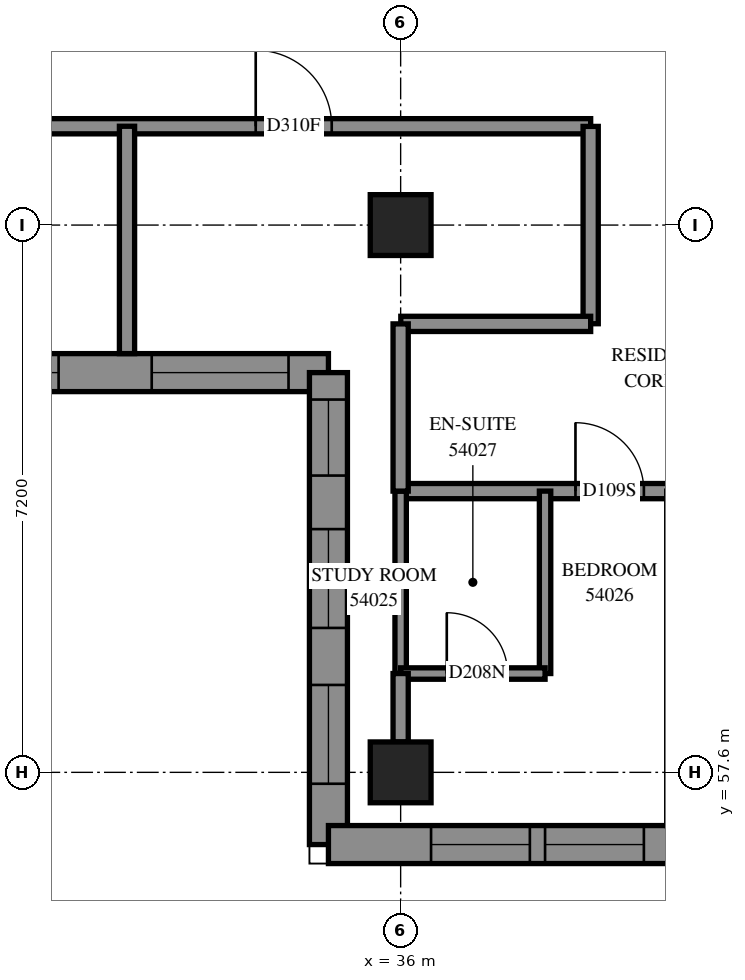
"""IFC4 building model, lengths in metres.
Left out: names, types, materials, properties, quantities, classifications, styles, units other than length and angle.
Written with IfcOpenShell. Run it as: python <this file> out.ifc"""

import sys

from ifc_helpers import new_model, si_unit, direction, frame, frame_2d, origin, origin_2d, place, context, subcontext, project, spatial, polyline, rectangle, outline, extrude, element, fill, save


model = new_model("IFC4")
c1 = context("Model", 3, precision=1e-05, world=origin(), true_north=direction((0.0, 1.0)))
c2 = subcontext(c1, "Body", "Model", "MODEL_VIEW")
j1 = project(units=[si_unit("LENGTHUNIT", "METRE"), si_unit("PLANEANGLEUNIT", "RADIAN")], contexts=[c1])
p1 = place(None, origin())
s1 = spatial("IfcSite", under=j1, at=p1, CompositionType="ELEMENT")
p2 = place(p1, origin())
s2 = spatial("IfcBuilding", under=s1, at=p2, CompositionType="ELEMENT")
p3 = place(p2, frame((0.0, 0.0, 199.8)))
s3 = spatial("IfcBuildingStorey", under=s2, at=p3, CompositionType="ELEMENT", Elevation=199.8)
for number, where, z_axis, x_axis in (
    (1, (36.0, 57.6, 0.0), (0.0, 0.0, 1.0), (1.0, 0.0, 0.0)),
    (2, (36.0, 64.8, 0.0), (0.0, 0.0, 1.0), (1.0, 0.0, 0.0)),
):
    element("IfcColumn", number, at=place(p3, frame(where, z_axis=z_axis, x_axis=x_axis)), inside=s3, PredefinedType="COLUMN", context=c2, shape_type="SweptSolid", body=[
        extrude(rectangle(XDim=0.8, YDim=0.8, at=origin_2d()), origin(), (0.0, 0.0, 1.0), 3.1),
    ])
p4 = place(p3, frame((19.659, 62.859, 0.0), z_axis=(0.0, 0.0, 1.0), x_axis=(1.0, 0.0, 0.0)))
e3 = element("IfcWall", 3, at=p4, inside=s3, PredefinedType="SOLIDWALL", context=c2, shape_type="SweptSolid", body=[
    extrude(outline(polyline([(-0.25, -0.25), (15.141, -0.25), (15.641, 0.25), (0.25, 0.25), (-0.25, -0.25)])), origin(), (0.0, 0.0, 1.0), 2.6),
])
p5 = place(p4, frame((2.691, 0.0, 0.6)))
e4 = element("IfcOpeningElement", 4, at=p5, cuts=e3, PredefinedType="OPENING", context=c2, shape_type="SweptSolid", body=[
    extrude(rectangle(XDim=1.8, YDim=1.9, at=frame_2d((0.9, 0.95))), frame((0.0, 0.26, 0.0), z_axis=(0.0, -1.0, 0.0), x_axis=(1.0, 0.0, 0.0)), (0.0, 0.0, 1.0), 0.52),
])
p6 = place(p4, frame((6.441, 0.0, 0.6)))
e5 = element("IfcOpeningElement", 5, at=p6, cuts=e3, PredefinedType="OPENING", context=c2, shape_type="SweptSolid", body=[
    extrude(rectangle(XDim=1.8, YDim=1.9, at=frame_2d((0.9, 0.95))), frame((0.0, 0.26, 0.0), z_axis=(0.0, -1.0, 0.0), x_axis=(1.0, 0.0, 0.0)), (0.0, 0.0, 1.0), 0.52),
])
p7 = place(p4, frame((10.041, 0.0, 0.6)))
e6 = element("IfcOpeningElement", 6, at=p7, cuts=e3, PredefinedType="OPENING", context=c2, shape_type="SweptSolid", body=[
    extrude(rectangle(XDim=1.8, YDim=1.9, at=frame_2d((0.9, 0.95))), frame((0.0, 0.26, 0.0), z_axis=(0.0, -1.0, 0.0), x_axis=(1.0, 0.0, 0.0)), (0.0, 0.0, 1.0), 0.52),
])
p8 = place(p4, frame((13.066, 0.0, 0.6)))
e7 = element("IfcOpeningElement", 7, at=p8, cuts=e3, PredefinedType="OPENING", context=c2, shape_type="SweptSolid", body=[
    extrude(rectangle(XDim=1.8, YDim=1.9, at=frame_2d((0.9, 0.95))), frame((0.0, 0.26, 0.0), z_axis=(0.0, -1.0, 0.0), x_axis=(1.0, 0.0, 0.0)), (0.0, 0.0, 1.0), 0.52),
])
p9 = place(p4, frame((0.596, 0.0, 0.6)))
e8 = element("IfcOpeningElement", 8, at=p9, cuts=e3, PredefinedType="OPENING", context=c2, shape_type="SweptSolid", body=[
    extrude(rectangle(XDim=1.2, YDim=1.9, at=frame_2d((0.6, 0.95))), frame((0.0, 0.26, 0.0), z_axis=(0.0, -1.0, 0.0), x_axis=(1.0, 0.0, 0.0)), (0.0, 0.0, 1.0), 0.52),
])
p10 = place(p3, frame((35.05, 62.859, 0.0), z_axis=(0.0, 0.0, 1.0), x_axis=(0.0, -1.0, 0.0)))
e9 = element("IfcWall", 9, at=p10, inside=s3, PredefinedType="SOLIDWALL", context=c2, shape_type="SweptSolid", body=[
    extrude(outline(polyline([(0.25, -0.25), (6.459, -0.25), (5.959, 0.25), (-0.25, 0.25), (0.25, -0.25)])), origin(), (0.0, 0.0, 1.0), 3.1),
])
p11 = place(p10, frame((2.059, 0.0, 0.45)))
e10 = element("IfcOpeningElement", 10, at=p11, cuts=e9, PredefinedType="OPENING", context=c2, shape_type="SweptSolid", body=[
    extrude(rectangle(XDim=1.3, YDim=2.5, at=frame_2d((0.65, 1.25))), frame((0.0, 0.26, 0.0), z_axis=(0.0, -1.0, 0.0), x_axis=(1.0, 0.0, 0.0)), (0.0, 0.0, 1.0), 0.52),
])
p12 = place(p10, frame((4.109, 0.0, 0.45)))
e11 = element("IfcOpeningElement", 11, at=p12, cuts=e9, PredefinedType="OPENING", context=c2, shape_type="SweptSolid", body=[
    extrude(rectangle(XDim=1.3, YDim=2.5, at=frame_2d((0.65, 1.25))), frame((0.0, 0.26, 0.0), z_axis=(0.0, -1.0, 0.0), x_axis=(1.0, 0.0, 0.0)), (0.0, 0.0, 1.0), 0.52),
])
p13 = place(p10, frame((0.354, 0.0, 0.45)))
e12 = element("IfcOpeningElement", 12, at=p13, cuts=e9, PredefinedType="OPENING", context=c2, shape_type="SweptSolid", body=[
    extrude(rectangle(XDim=1.0, YDim=2.5, at=frame_2d((0.5, 1.25))), frame((0.0, 0.26, 0.0), z_axis=(0.0, -1.0, 0.0), x_axis=(1.0, 0.0, 0.0)), (0.0, 0.0, 1.0), 0.52),
])
p14 = place(p3, frame((35.05, 56.65, 0.0), z_axis=(0.0, 0.0, 1.0), x_axis=(1.0, 0.0, 0.0)))
e13 = element("IfcWall", 13, at=p14, inside=s3, PredefinedType="SOLIDWALL", context=c2, shape_type="SweptSolid", body=[
    extrude(outline(polyline([(-0.25, -0.25), (6.95, -0.25), (7.45, 0.25), (0.25, 0.25), (-0.25, -0.25)])), origin(), (0.0, 0.0, 1.0), 3.1),
])
p15 = place(p14, frame((1.35, 0.0, 0.45)))
e14 = element("IfcOpeningElement", 14, at=p15, cuts=e13, PredefinedType="OPENING", context=c2, shape_type="SweptSolid", body=[
    extrude(rectangle(XDim=1.3, YDim=2.5, at=frame_2d((0.65, 1.25))), frame((0.0, 0.26, 0.0), z_axis=(0.0, -1.0, 0.0), x_axis=(1.0, 0.0, 0.0)), (0.0, 0.0, 1.0), 0.52),
])
p16 = place(p14, frame((2.85, 0.0, 0.45)))
e15 = element("IfcOpeningElement", 15, at=p16, cuts=e13, PredefinedType="OPENING", context=c2, shape_type="SweptSolid", body=[
    extrude(rectangle(XDim=1.3, YDim=2.5, at=frame_2d((0.65, 1.25))), frame((0.0, 0.26, 0.0), z_axis=(0.0, -1.0, 0.0), x_axis=(1.0, 0.0, 0.0)), (0.0, 0.0, 1.0), 0.52),
])
p17 = place(p14, frame((5.175, 0.0, 0.45)))
e16 = element("IfcOpeningElement", 16, at=p17, cuts=e13, PredefinedType="OPENING", context=c2, shape_type="SweptSolid", body=[
    extrude(rectangle(XDim=1.2, YDim=2.5, at=frame_2d((0.6, 1.25))), frame((0.0, 0.26, 0.0), z_axis=(0.0, -1.0, 0.0), x_axis=(1.0, 0.0, 0.0)), (0.0, 0.0, 1.0), 0.52),
])
p18 = place(p3, frame((21.6, 66.1, 0.0), z_axis=(0.0, 0.0, 1.0), x_axis=(1.0, 0.0, 0.0)))
e17 = element("IfcWall", 17, at=p18, inside=s3, PredefinedType="PARTITIONING", context=c2, shape_type="SweptSolid", body=[
    extrude(rectangle(XDim=16.9, YDim=0.2, at=frame_2d((8.45, 0.0))), origin(), (0.0, 0.0, 1.0), 3.1),
])
p19 = place(p18, frame((12.493, 0.0, 0.0)))
e18 = element("IfcOpeningElement", 18, at=p19, cuts=e17, PredefinedType="OPENING", context=c2, shape_type="SweptSolid", body=[
    extrude(rectangle(XDim=1.0, YDim=2.1, at=frame_2d((0.5, 1.05))), frame((0.0, 0.11, 0.0), z_axis=(0.0, -1.0, 0.0), x_axis=(1.0, 0.0, 0.0)), (0.0, 0.0, 1.0), 0.22),
])
p20 = place(p3, frame((36.0, 61.3, 0.0), z_axis=(0.0, 0.0, 1.0), x_axis=(1.0, 0.0, 0.0)))
e19 = element("IfcWall", 19, at=p20, inside=s3, PredefinedType="PARTITIONING", context=c2, shape_type="SweptSolid", body=[
    extrude(rectangle(XDim=16.9, YDim=0.2, at=frame_2d((8.45, 0.0))), origin(), (0.0, 0.0, 1.0), 3.1),
])
p21 = place(p20, frame((2.3, 0.0, 0.0)))
e20 = element("IfcOpeningElement", 20, at=p21, cuts=e19, PredefinedType="OPENING", context=c2, shape_type="SweptSolid", body=[
    extrude(rectangle(XDim=0.9, YDim=2.1, at=frame_2d((0.45, 1.05))), frame((0.0, 0.11, 0.0), z_axis=(0.0, -1.0, 0.0), x_axis=(1.0, 0.0, 0.0)), (0.0, 0.0, 1.0), 0.22),
])
p22 = place(p20, frame((4.107, 0.0, 0.0)))
e21 = element("IfcOpeningElement", 21, at=p22, cuts=e19, PredefinedType="OPENING", context=c2, shape_type="SweptSolid", body=[
    extrude(rectangle(XDim=1.0, YDim=2.1, at=frame_2d((0.5, 1.05))), frame((0.0, 0.11, 0.0), z_axis=(0.0, -1.0, 0.0), x_axis=(1.0, 0.0, 0.0)), (0.0, 0.0, 1.0), 0.22),
])
p23 = place(p20, frame((9.5, 0.0, 0.0)))
e22 = element("IfcOpeningElement", 22, at=p23, cuts=e19, PredefinedType="OPENING", context=c2, shape_type="SweptSolid", body=[
    extrude(rectangle(XDim=0.9, YDim=2.1, at=frame_2d((0.45, 1.05))), frame((0.0, 0.11, 0.0), z_axis=(0.0, -1.0, 0.0), x_axis=(1.0, 0.0, 0.0)), (0.0, 0.0, 1.0), 0.22),
])
p24 = place(p20, frame((11.307, 0.0, 0.0)))
e23 = element("IfcOpeningElement", 23, at=p24, cuts=e19, PredefinedType="OPENING", context=c2, shape_type="SweptSolid", body=[
    extrude(rectangle(XDim=1.0, YDim=2.1, at=frame_2d((0.5, 1.05))), frame((0.0, 0.11, 0.0), z_axis=(0.0, -1.0, 0.0), x_axis=(1.0, 0.0, 0.0)), (0.0, 0.0, 1.0), 0.22),
])
p25 = place(p20, frame((15.647, 0.0, 0.0)))
e24 = element("IfcOpeningElement", 24, at=p25, cuts=e19, PredefinedType="OPENING", context=c2, shape_type="SweptSolid", body=[
    extrude(rectangle(XDim=1.0, YDim=2.1, at=frame_2d((0.5, 1.05))), frame((0.0, 0.11, 0.0), z_axis=(0.0, -1.0, 0.0), x_axis=(1.0, 0.0, 0.0)), (0.0, 0.0, 1.0), 0.22),
])
p26 = place(p3, frame((32.4, 63.109, 0.0), z_axis=(0.0, 0.0, 1.0), x_axis=(0.0, 1.0, 0.0)))
e25 = element("IfcWall", 25, at=p26, inside=s3, PredefinedType="PARTITIONING", context=c2, shape_type="SweptSolid", body=[
    extrude(rectangle(XDim=2.991, YDim=0.2, at=frame_2d((1.496, 0.0))), origin(), (0.0, 0.0, 1.0), 3.1),
])
p27 = place(p3, frame((38.5, 63.502, 0.0), z_axis=(0.0, 0.0, 1.0), x_axis=(0.0, 1.0, 0.0)))
e26 = element("IfcWall", 26, at=p27, inside=s3, PredefinedType="PARTITIONING", context=c2, shape_type="SweptSolid", body=[
    extrude(rectangle(XDim=2.596, YDim=0.2, at=frame_2d((1.298, 0.0))), origin(), (0.0, 0.0, 1.0), 3.1),
])
p28 = place(p3, frame((36.002, 63.5, 0.0), z_axis=(0.0, 0.0, 1.0), x_axis=(1.0, 0.0, 0.0)))
e27 = element("IfcWall", 27, at=p28, inside=s3, PredefinedType="PARTITIONING", context=c2, shape_type="SweptSolid", body=[
    extrude(rectangle(XDim=2.498, YDim=0.2, at=frame_2d((1.249, 0.0))), origin(), (0.0, 0.0, 1.0), 3.1),
])
p29 = place(p3, frame((37.9, 58.9, 0.0), z_axis=(0.0, 0.0, 1.0), x_axis=(0.0, 1.0, 0.0)))
e28 = element("IfcWall", 28, at=p29, inside=s3, PredefinedType="PARTITIONING", context=c2, shape_type="SweptSolid", body=[
    extrude(rectangle(XDim=2.4, YDim=0.15, at=frame_2d((1.2, 0.0))), origin(), (0.0, 0.0, 1.0), 3.1),
])
p30 = place(p3, frame((36.0, 58.9, 0.0), z_axis=(0.0, 0.0, 1.0), x_axis=(0.0, 1.0, 0.0)))
e29 = element("IfcWall", 29, at=p30, inside=s3, PredefinedType="PARTITIONING", context=c2, shape_type="SweptSolid", body=[
    extrude(rectangle(XDim=2.4, YDim=0.15, at=frame_2d((1.2, 0.0))), origin(), (0.0, 0.0, 1.0), 2.6),
])
p31 = place(p3, frame((36.0, 61.3, 0.0), z_axis=(0.0, 0.0, 1.0), x_axis=(0.0, 1.0, 0.0)))
e30 = element("IfcWall", 30, at=p31, inside=s3, PredefinedType="PARTITIONING", context=c2, shape_type="SweptSolid", body=[
    extrude(rectangle(XDim=2.2, YDim=0.2, at=frame_2d((1.1, 0.0))), origin(), (0.0, 0.0, 1.0), 2.6),
])
p32 = place(p3, frame((36.0, 58.9, 0.0), z_axis=(0.0, 0.0, 1.0), x_axis=(1.0, 0.0, 0.0)))
e31 = element("IfcWall", 31, at=p32, inside=s3, PredefinedType="PARTITIONING", context=c2, shape_type="SweptSolid", body=[
    extrude(rectangle(XDim=1.9, YDim=0.15, at=frame_2d((0.95, 0.0))), origin(), (0.0, 0.0, 1.0), 3.1),
])
p33 = place(p32, frame((0.607, 0.0, 0.0)))
e32 = element("IfcOpeningElement", 32, at=p33, cuts=e31, PredefinedType="OPENING", context=c2, shape_type="SweptSolid", body=[
    extrude(rectangle(XDim=0.8, YDim=2.1, at=frame_2d((0.4, 1.05))), frame((0.0, 0.085, 0.0), z_axis=(0.0, -1.0, 0.0), x_axis=(1.0, 0.0, 0.0)), (0.0, 0.0, 1.0), 0.17),
])
p34 = place(p3, frame((36.0, 58.0, 0.0), z_axis=(0.0, 0.0, 1.0), x_axis=(0.0, 1.0, 0.0)))
e33 = element("IfcWall", 33, at=p34, inside=s3, PredefinedType="PARTITIONING", context=c2, shape_type="SweptSolid", body=[
    extrude(rectangle(XDim=0.9, YDim=0.2, at=frame_2d((0.45, 0.0))), origin(), (0.0, 0.0, 1.0), 2.6),
])
p35 = place(p7, origin())
e34 = element("IfcWindow", 34, at=p35, inside=s3, PartitioningType="SINGLE_PANEL", PredefinedType="WINDOW", context=c2, shape_type="SweptSolid", body=[
    extrude(rectangle(XDim=1.8, YDim=1.9, at=frame_2d((0.9, 0.95))), frame((0.0, 0.18, 0.0), z_axis=(0.0, -1.0, 0.0), x_axis=(1.0, 0.0, 0.0)), (0.0, 0.0, 1.0), 0.06),
])
fill(e6, e34)
p36 = place(p8, origin())
e35 = element("IfcWindow", 35, at=p36, inside=s3, PartitioningType="SINGLE_PANEL", PredefinedType="WINDOW", context=c2, shape_type="SweptSolid", body=[
    extrude(rectangle(XDim=1.8, YDim=1.9, at=frame_2d((0.9, 0.95))), frame((0.0, 0.18, 0.0), z_axis=(0.0, -1.0, 0.0), x_axis=(1.0, 0.0, 0.0)), (0.0, 0.0, 1.0), 0.06),
])
fill(e7, e35)
p37 = place(p11, origin())
e36 = element("IfcWindow", 36, at=p37, inside=s3, PartitioningType="SINGLE_PANEL", PredefinedType="WINDOW", context=c2, shape_type="SweptSolid", body=[
    extrude(rectangle(XDim=1.3, YDim=2.5, at=frame_2d((0.65, 1.25))), frame((0.0, 0.18, 0.0), z_axis=(0.0, -1.0, 0.0), x_axis=(1.0, 0.0, 0.0)), (0.0, 0.0, 1.0), 0.06),
])
fill(e10, e36)
p38 = place(p12, origin())
e37 = element("IfcWindow", 37, at=p38, inside=s3, PartitioningType="SINGLE_PANEL", PredefinedType="WINDOW", context=c2, shape_type="SweptSolid", body=[
    extrude(rectangle(XDim=1.3, YDim=2.5, at=frame_2d((0.65, 1.25))), frame((0.0, 0.18, 0.0), z_axis=(0.0, -1.0, 0.0), x_axis=(1.0, 0.0, 0.0)), (0.0, 0.0, 1.0), 0.06),
])
fill(e11, e37)
p39 = place(p15, origin())
e38 = element("IfcWindow", 38, at=p39, inside=s3, PartitioningType="SINGLE_PANEL", PredefinedType="WINDOW", context=c2, shape_type="SweptSolid", body=[
    extrude(rectangle(XDim=1.3, YDim=2.5, at=frame_2d((0.65, 1.25))), frame((0.0, 0.18, 0.0), z_axis=(0.0, -1.0, 0.0), x_axis=(1.0, 0.0, 0.0)), (0.0, 0.0, 1.0), 0.06),
])
fill(e14, e38)
p40 = place(p16, origin())
e39 = element("IfcWindow", 39, at=p40, inside=s3, PartitioningType="SINGLE_PANEL", PredefinedType="WINDOW", context=c2, shape_type="SweptSolid", body=[
    extrude(rectangle(XDim=1.3, YDim=2.5, at=frame_2d((0.65, 1.25))), frame((0.0, 0.18, 0.0), z_axis=(0.0, -1.0, 0.0), x_axis=(1.0, 0.0, 0.0)), (0.0, 0.0, 1.0), 0.06),
])
fill(e15, e39)
p41 = place(p19, origin())
e40 = element("IfcDoor", 40, at=p41, inside=s3, OperationType="SINGLE_SWING_RIGHT", PredefinedType="DOOR", context=c2, shape_type="SweptSolid", body=[
    extrude(rectangle(XDim=1.0, YDim=2.1, at=frame_2d((0.5, 1.05))), frame((0.0, 0.025, 0.0), z_axis=(0.0, -1.0, 0.0), x_axis=(1.0, 0.0, 0.0)), (0.0, 0.0, 1.0), 0.05),
])
fill(e18, e40)
p42 = place(p21, origin())
e41 = element("IfcDoor", 41, at=p42, inside=s3, OperationType="SINGLE_SWING_LEFT", PredefinedType="DOOR", context=c2, shape_type="SweptSolid", body=[
    extrude(rectangle(XDim=0.9, YDim=2.1, at=frame_2d((0.45, 1.05))), frame((0.0, 0.025, 0.0), z_axis=(0.0, -1.0, 0.0), x_axis=(1.0, 0.0, 0.0)), (0.0, 0.0, 1.0), 0.05),
])
fill(e20, e41)
p43 = place(p33, origin())
e42 = element("IfcDoor", 42, at=p43, inside=s3, OperationType="SINGLE_SWING_RIGHT", PredefinedType="DOOR", context=c2, shape_type="SweptSolid", body=[
    extrude(rectangle(XDim=0.8, YDim=2.1, at=frame_2d((0.4, 1.05))), frame((0.0, 0.025, 0.0), z_axis=(0.0, -1.0, 0.0), x_axis=(1.0, 0.0, 0.0)), (0.0, 0.0, 1.0), 0.05),
])
fill(e32, e42)
p44 = place(p13, origin())
e43 = element("IfcWindow", 43, at=p44, inside=s3, PartitioningType="SINGLE_PANEL", PredefinedType="WINDOW", context=c2, shape_type="SweptSolid", body=[
    extrude(rectangle(XDim=1.0, YDim=2.5, at=frame_2d((0.5, 1.25))), frame((0.0, 0.18, 0.0), z_axis=(0.0, -1.0, 0.0), x_axis=(1.0, 0.0, 0.0)), (0.0, 0.0, 1.0), 0.06),
])
fill(e12, e43)
save(model, sys.argv[1])
